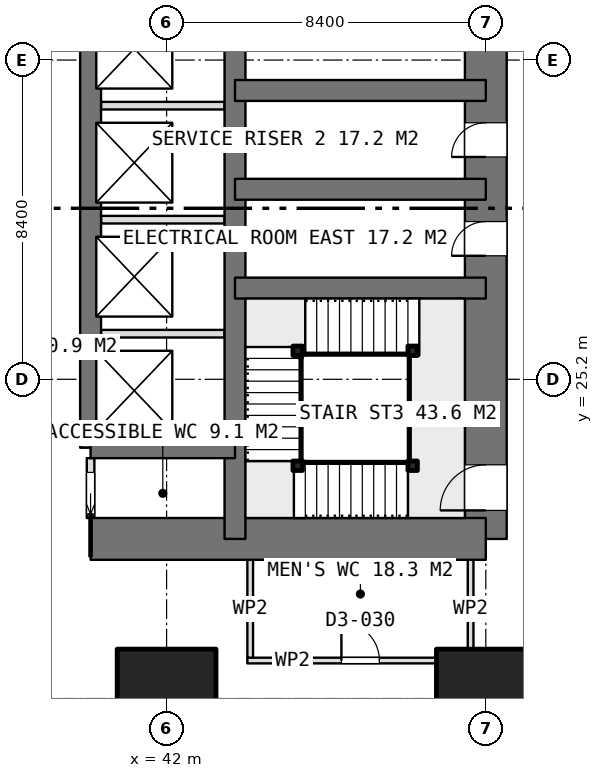
"""IFC4 building model, lengths in metres.
Left out: names, types, materials, properties, quantities, classifications, styles, units other than length and angle.
Written with IfcOpenShell. Run it as: python <this file> out.ifc"""

import sys

from ifc_helpers import new_model, si_unit, direction, frame, frame_2d, origin, origin_2d, place, context, subcontext, project, spatial, rectangle, extrude, element, fill, save


model = new_model("IFC4")
c1 = context("Model", 3, precision=1e-05, world=origin(), true_north=direction((0.0, 1.0)))
c2 = subcontext(c1, "Body", "Model", "MODEL_VIEW")
j1 = project(units=[si_unit("LENGTHUNIT", "METRE"), si_unit("PLANEANGLEUNIT", "RADIAN")], contexts=[c1])
p1 = place(None, origin())
s1 = spatial("IfcSite", under=j1, at=p1, CompositionType="ELEMENT")
p2 = place(p1, origin())
s2 = spatial("IfcBuilding", under=s1, at=p2, CompositionType="ELEMENT")
p3 = place(p2, frame((0.0, 0.0, 25.4)))
s3 = spatial("IfcBuildingStorey", under=s2, at=p3, CompositionType="ELEMENT", Elevation=25.4)
p4 = place(p3, frame((40.0, 21.0, 0.0), z_axis=(0.0, 0.0, 1.0), x_axis=(1.0, 0.0, 0.0)))
e1 = element("IfcWall", 1, at=p4, inside=s3, PredefinedType="SHEAR", context=c2, shape_type="SweptSolid", body=[
    extrude(rectangle(XDim=10.4, YDim=1.1, at=frame_2d((5.2, 0.0))), origin(), (0.0, 0.0, 1.0), 3.75),
])
p5 = place(p3, frame((50.4, 21.0, 0.0), z_axis=(0.0, 0.0, 1.0), x_axis=(0.0, 1.0, 0.0)))
e2 = element("IfcWall", 2, at=p5, inside=s3, PredefinedType="SHEAR", context=c2, shape_type="SweptSolid", body=[
    extrude(rectangle(XDim=25.2, YDim=1.1, at=frame_2d((12.6, 0.0))), origin(), (0.0, 0.0, 1.0), 3.75),
])
p6 = place(p5, frame((16.2, 0.0, 0.0)))
e3 = element("IfcOpeningElement", 3, at=p6, cuts=e2, PredefinedType="OPENING", context=c2, shape_type="SweptSolid", body=[
    extrude(rectangle(XDim=1.2, YDim=2.1, at=frame_2d((0.6, 1.05))), frame((0.0, 0.56, 0.0), z_axis=(0.0, -1.0, 0.0), x_axis=(1.0, 0.0, 0.0)), (0.0, 0.0, 1.0), 1.12),
])
p7 = place(p5, frame((10.05, 0.0, 0.0)))
e4 = element("IfcOpeningElement", 4, at=p7, cuts=e2, PredefinedType="OPENING", context=c2, shape_type="SweptSolid", body=[
    extrude(rectangle(XDim=0.9, YDim=2.1, at=frame_2d((0.45, 1.05))), frame((0.0, 0.56, 0.0), z_axis=(0.0, -1.0, 0.0), x_axis=(1.0, 0.0, 0.0)), (0.0, 0.0, 1.0), 1.12),
])
p8 = place(p5, frame((7.45, 0.0, 0.0)))
e5 = element("IfcOpeningElement", 5, at=p8, cuts=e2, PredefinedType="OPENING", context=c2, shape_type="SweptSolid", body=[
    extrude(rectangle(XDim=0.9, YDim=2.1, at=frame_2d((0.45, 1.05))), frame((0.0, 0.56, 0.0), z_axis=(0.0, -1.0, 0.0), x_axis=(1.0, 0.0, 0.0)), (0.0, 0.0, 1.0), 1.12),
])
p9 = place(p5, frame((0.75, 0.0, 0.0)))
e6 = element("IfcOpeningElement", 6, at=p9, cuts=e2, PredefinedType="OPENING", context=c2, shape_type="SweptSolid", body=[
    extrude(rectangle(XDim=1.2, YDim=2.1, at=frame_2d((0.6, 1.05))), frame((0.0, 0.56, 0.0), z_axis=(0.0, -1.0, 0.0), x_axis=(1.0, 0.0, 0.0)), (0.0, 0.0, 1.0), 1.12),
])
p10 = place(p3, frame((43.8, 21.0, 0.0), z_axis=(0.0, 0.0, 1.0), x_axis=(0.0, 1.0, 0.0)))
e7 = element("IfcWall", 7, at=p10, inside=s3, PredefinedType="SHEAR", context=c2, shape_type="SweptSolid", body=[
    extrude(rectangle(XDim=25.2, YDim=0.55, at=frame_2d((12.6, 0.0))), origin(), (0.0, 0.0, 1.0), 3.75),
])
p11 = place(p3, frame((40.0, 23.4, 0.0), z_axis=(0.0, 0.0, 1.0), x_axis=(0.0, 1.0, 0.0)))
e8 = element("IfcWall", 8, at=p11, inside=s3, PredefinedType="SHEAR", context=c2, shape_type="SweptSolid", body=[
    extrude(rectangle(XDim=18.0, YDim=0.55, at=frame_2d((9.0, 0.0))), origin(), (0.0, 0.0, 1.0), 3.75),
])
p12 = place(p3, frame((40.0, 23.4, 0.0), z_axis=(0.0, 0.0, 1.0), x_axis=(1.0, 0.0, 0.0)))
e9 = element("IfcWall", 9, at=p12, inside=s3, PredefinedType="SHEAR", context=c2, shape_type="SweptSolid", body=[
    extrude(rectangle(XDim=3.8, YDim=0.55, at=frame_2d((1.9, 0.0))), origin(), (0.0, 0.0, 1.0), 3.75),
])
for number, where, z_axis, x_axis in (
    (10, (43.8, 27.6, 0.0), (0.0, 0.0, 1.0), (1.0, 0.0, 0.0)),
    (11, (43.8, 30.2, 0.0), (0.0, 0.0, 1.0), (1.0, 0.0, 0.0)),
    (12, (43.8, 32.8, 0.0), (0.0, 0.0, 1.0), (1.0, 0.0, 0.0)),
):
    element("IfcWall", number, at=place(p3, frame(where, z_axis=z_axis, x_axis=x_axis)), inside=s3, PredefinedType="SHEAR", context=c2, shape_type="SweptSolid", body=[
        extrude(rectangle(XDim=6.6, YDim=0.55, at=frame_2d((3.3, 0.0))), origin(), (0.0, 0.0, 1.0), 3.75),
    ])
for number, where, z_axis, x_axis in (
    (13, (42.0, 16.8, 0.0), (0.0, 0.0, 1.0), (1.0, 0.0, 0.0)),
    (14, (50.4, 16.8, 0.0), (0.0, 0.0, 1.0), (1.0, 0.0, 0.0)),
):
    element("IfcColumn", number, at=place(p3, frame(where, z_axis=z_axis, x_axis=x_axis)), inside=s3, PredefinedType="COLUMN", context=c2, shape_type="SweptSolid", body=[
        extrude(rectangle(XDim=2.6, YDim=2.6, at=origin_2d()), origin(), (0.0, 0.0, 1.0), 3.75),
    ])
for number, where, z_axis, x_axis in (
    (15, (40.275, 26.4, 0.0), (0.0, 0.0, 1.0), (1.0, 0.0, 0.0)),
    (16, (40.275, 29.4, 0.0), (0.0, 0.0, 1.0), (1.0, 0.0, 0.0)),
    (17, (40.275, 32.4, 0.0), (0.0, 0.0, 1.0), (1.0, 0.0, 0.0)),
):
    element("IfcWall", number, at=place(p3, frame(where, z_axis=z_axis, x_axis=x_axis)), inside=s3, PredefinedType="PARTITIONING", context=c2, shape_type="SweptSolid", body=[
        extrude(rectangle(XDim=3.25, YDim=0.2, at=frame_2d((1.625, 0.0))), origin(), (0.0, 0.0, 1.0), 3.5),
    ])
p13 = place(p3, frame((40.0, 21.55, 0.0), z_axis=(0.0, 0.0, 1.0), x_axis=(0.0, 1.0, 0.0)))
e18 = element("IfcWall", 18, at=p13, inside=s3, PredefinedType="PARTITIONING", context=c2, shape_type="SweptSolid", body=[
    extrude(rectangle(XDim=1.575, YDim=0.2, at=frame_2d((0.788, 0.0))), origin(), (0.0, 0.0, 1.0), 3.5),
])
p14 = place(p13, frame((0.1, 0.0, 0.0)))
e19 = element("IfcOpeningElement", 19, at=p14, cuts=e18, PredefinedType="OPENING", context=c2, shape_type="SweptSolid", body=[
    extrude(rectangle(XDim=1.1, YDim=2.1, at=frame_2d((0.55, 1.05))), frame((0.0, 0.11, 0.0), z_axis=(0.0, -1.0, 0.0), x_axis=(1.0, 0.0, 0.0)), (0.0, 0.0, 1.0), 0.22),
])
p15 = place(p3, frame((44.125, 17.8, 0.0), z_axis=(0.0, 0.0, 1.0), x_axis=(1.0, 0.0, 0.0)))
e20 = element("IfcWall", 20, at=p15, inside=s3, PredefinedType="PARTITIONING", context=c2, shape_type="SweptSolid", body=[
    extrude(rectangle(XDim=5.95, YDim=0.15, at=frame_2d((2.975, 0.0))), origin(), (0.0, 0.0, 1.0), 3.5),
])
p16 = place(p15, frame((2.475, 0.0, 0.0)))
e21 = element("IfcOpeningElement", 21, at=p16, cuts=e20, PredefinedType="OPENING", context=c2, shape_type="SweptSolid", body=[
    extrude(rectangle(XDim=1.0, YDim=2.1, at=frame_2d((0.5, 1.05))), frame((0.0, 0.085, 0.0), z_axis=(0.0, -1.0, 0.0), x_axis=(1.0, 0.0, 0.0)), (0.0, 0.0, 1.0), 0.17),
])
for number, where, z_axis, x_axis in (
    (22, (44.2, 17.875, 0.0), (0.0, 0.0, 1.0), (0.0, 1.0, 0.0)),
    (23, (50.0, 17.875, 0.0), (0.0, 0.0, 1.0), (0.0, 1.0, 0.0)),
):
    element("IfcWall", number, at=place(p3, frame(where, z_axis=z_axis, x_axis=x_axis)), inside=s3, PredefinedType="PARTITIONING", context=c2, shape_type="SweptSolid", body=[
        extrude(rectangle(XDim=2.575, YDim=0.15, at=frame_2d((1.288, 0.0))), origin(), (0.0, 0.0, 1.0), 3.5),
    ])
for number, where, z_axis, x_axis in (
    (24, (48.475, 22.925, 0.0), (0.0, 0.0, 1.0), (1.0, 0.0, 0.0)),
    (25, (45.45, 22.925, 0.0), (0.0, 0.0, 1.0), (1.0, 0.0, 0.0)),
    (26, (45.45, 25.95, 0.0), (0.0, 0.0, 1.0), (1.0, 0.0, 0.0)),
    (27, (48.475, 25.95, 0.0), (0.0, 0.0, 1.0), (1.0, 0.0, 0.0)),
):
    element("IfcColumn", number, at=place(p3, frame(where, z_axis=z_axis, x_axis=x_axis)), inside=s3, PredefinedType="COLUMN", context=c2, shape_type="SweptSolid", body=[
        extrude(rectangle(XDim=0.25, YDim=0.25, at=origin_2d()), origin(), (0.0, 0.0, 1.0), 3.75),
    ])
p17 = place(p7, origin())
e28 = element("IfcDoor", 28, at=p17, inside=s3, OperationType="SINGLE_SWING_LEFT", PredefinedType="DOOR", context=c2, shape_type="SweptSolid", body=[
    extrude(rectangle(XDim=0.9, YDim=2.1, at=frame_2d((0.45, 1.05))), frame((0.0, 0.025, 0.0), z_axis=(0.0, -1.0, 0.0), x_axis=(1.0, 0.0, 0.0)), (0.0, 0.0, 1.0), 0.05),
])
fill(e4, e28)
p18 = place(p8, origin())
e29 = element("IfcDoor", 29, at=p18, inside=s3, OperationType="SINGLE_SWING_LEFT", PredefinedType="DOOR", context=c2, shape_type="SweptSolid", body=[
    extrude(rectangle(XDim=0.9, YDim=2.1, at=frame_2d((0.45, 1.05))), frame((0.0, 0.025, 0.0), z_axis=(0.0, -1.0, 0.0), x_axis=(1.0, 0.0, 0.0)), (0.0, 0.0, 1.0), 0.05),
])
fill(e5, e29)
p19 = place(p14, origin())
e30 = element("IfcDoor", 30, at=p19, inside=s3, OperationType="SLIDING_TO_LEFT", PredefinedType="DOOR", context=c2, shape_type="SweptSolid", body=[
    extrude(rectangle(XDim=1.1, YDim=2.1, at=frame_2d((0.55, 1.05))), frame((0.0, 0.025, 0.0), z_axis=(0.0, -1.0, 0.0), x_axis=(1.0, 0.0, 0.0)), (0.0, 0.0, 1.0), 0.05),
])
fill(e19, e30)
p20 = place(p16, origin())
e31 = element("IfcDoor", 31, at=p20, inside=s3, OperationType="SINGLE_SWING_LEFT", PredefinedType="DOOR", context=c2, shape_type="SweptSolid", body=[
    extrude(rectangle(XDim=1.0, YDim=2.1, at=frame_2d((0.5, 1.05))), frame((0.0, 0.025, 0.0), z_axis=(0.0, -1.0, 0.0), x_axis=(1.0, 0.0, 0.0)), (0.0, 0.0, 1.0), 0.05),
])
fill(e21, e31)
p21 = place(p9, origin())
e32 = element("IfcDoor", 32, at=p21, inside=s3, OperationType="SINGLE_SWING_RIGHT", PredefinedType="DOOR", context=c2, shape_type="SweptSolid", body=[
    extrude(rectangle(XDim=1.2, YDim=2.1, at=frame_2d((0.6, 1.05))), frame((0.0, 0.025, 0.0), z_axis=(0.0, -1.0, 0.0), x_axis=(1.0, 0.0, 0.0)), (0.0, 0.0, 1.0), 0.05),
])
fill(e6, e32)
save(model, sys.argv[1])
